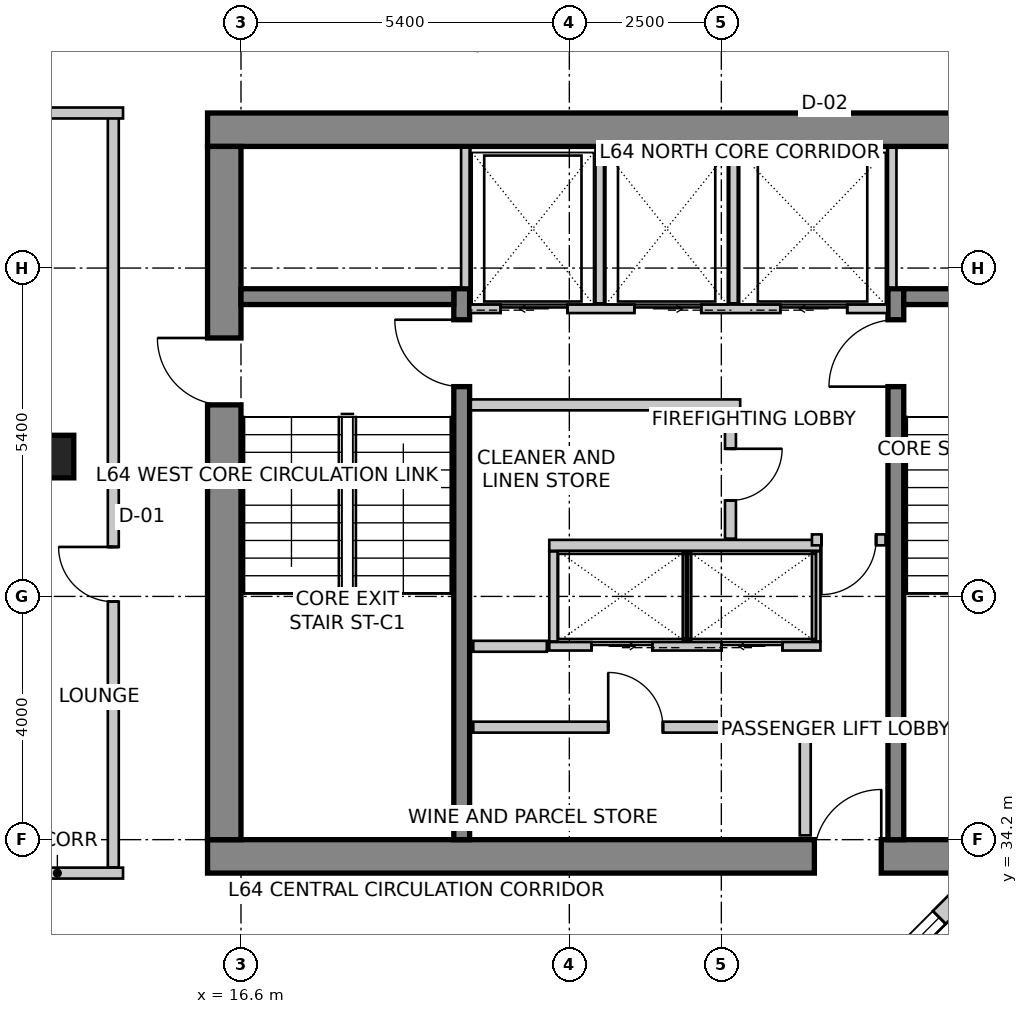
"""IFC4 building model, lengths in metres.
Left out: names, types, materials, properties, quantities, classifications, styles, units other than length and angle.
Written with IfcOpenShell. Run it as: python <this file> out.ifc"""

import sys

from ifc_helpers import new_model, si_unit, direction, frame, frame_2d, origin, origin_2d, place, context, subcontext, project, spatial, rectangle, extrude, source, transform, mapped, element, fill, save


model = new_model("IFC4")
c1 = context("Model", 3, precision=1e-05, world=origin(), true_north=direction((0.0, 1.0)))
c2 = subcontext(c1, "Body", "Model", "MODEL_VIEW")
j1 = project(units=[si_unit("LENGTHUNIT", "METRE"), si_unit("PLANEANGLEUNIT", "RADIAN")], contexts=[c1])
p1 = place(None, origin())
s1 = spatial("IfcSite", under=j1, at=p1, CompositionType="ELEMENT")
p2 = place(p1, origin())
s2 = spatial("IfcBuilding", under=s1, at=p2, CompositionType="ELEMENT")
p3 = place(p2, frame((0.0, 0.0, 252.9)))
s3 = spatial("IfcBuildingStorey", under=s2, at=p3, CompositionType="ELEMENT", Elevation=252.9)
p4 = place(p3, frame((16.05, 45.875, 0.0), z_axis=(0.0, 0.0, 1.0), x_axis=(1.0, 0.0, 0.0)))
e1 = element("IfcWall", 1, at=p4, inside=s3, PredefinedType="SHEAR", context=c2, shape_type="SweptSolid", body=[
    extrude(rectangle(XDim=15.5, YDim=0.55, at=frame_2d((7.75, 0.0))), origin(), (0.0, 0.0, 1.0), 3.6),
])
p5 = place(p3, frame((16.05, 33.925, 0.0), z_axis=(0.0, 0.0, 1.0), x_axis=(1.0, 0.0, 0.0)))
e2 = element("IfcWall", 2, at=p5, inside=s3, PredefinedType="SHEAR", context=c2, shape_type="SweptSolid", body=[
    extrude(rectangle(XDim=15.5, YDim=0.55, at=frame_2d((7.75, 0.0))), origin(), (0.0, 0.0, 1.0), 3.6),
])
m1 = source(origin(), c2, "Body", "SweptSolid", [
    extrude(rectangle(XDim=1.1, YDim=2.15, at=frame_2d((0.55, 1.075))), frame((0.0, 0.285, 0.0), z_axis=(0.0, -1.0, 0.0), x_axis=(1.0, 0.0, 0.0)), (0.0, 0.0, 1.0), 0.57),
])
p6 = place(p5, frame((9.98, 0.0, 0.0)))
e3 = element("IfcOpeningElement", 3, at=p6, cuts=e2, PredefinedType="OPENING", context=c2, shape_type="MappedRepresentation", body=[
    mapped(m1, transform((0.0, 0.0, 0.0), scale=1.0)),
])
p7 = place(p3, frame((16.325, 34.2, 0.0), z_axis=(0.0, 0.0, 1.0), x_axis=(0.0, 1.0, 0.0)))
e4 = element("IfcWall", 4, at=p7, inside=s3, PredefinedType="SHEAR", context=c2, shape_type="SweptSolid", body=[
    extrude(rectangle(XDim=11.4, YDim=0.55, at=frame_2d((5.7, 0.0))), origin(), (0.0, 0.0, 1.0), 3.6),
])
p8 = place(p7, frame((7.15, 0.0, 0.0)))
e5 = element("IfcOpeningElement", 5, at=p8, cuts=e4, PredefinedType="OPENING", context=c2, shape_type="MappedRepresentation", body=[
    mapped(m1, transform((0.0, 0.0, 0.0), scale=1.0)),
])
p9 = place(p3, frame((20.23, 34.2, 0.0), z_axis=(0.0, 0.0, 1.0), x_axis=(0.0, 1.0, 0.0)))
e6 = element("IfcWall", 6, at=p9, inside=s3, PredefinedType="SHEAR", context=c2, shape_type="SweptSolid", body=[
    extrude(rectangle(XDim=9.06, YDim=0.26, at=frame_2d((4.53, 0.0))), origin(), (0.0, 0.0, 1.0), 3.6),
])
m2 = source(origin(), c2, "Body", "SweptSolid", [
    extrude(rectangle(XDim=1.1, YDim=2.15, at=frame_2d((0.55, 1.075))), frame((0.0, 0.14, 0.0), z_axis=(0.0, -1.0, 0.0), x_axis=(1.0, 0.0, 0.0)), (0.0, 0.0, 1.0), 0.28),
])
p10 = place(p9, frame((7.45, 0.0, 0.0)))
e7 = element("IfcOpeningElement", 7, at=p10, cuts=e6, PredefinedType="OPENING", context=c2, shape_type="MappedRepresentation", body=[
    mapped(m2, transform((0.0, 0.0, 0.0), scale=1.0)),
])
p11 = place(p3, frame((27.37, 34.2, 0.0), z_axis=(0.0, 0.0, 1.0), x_axis=(0.0, 1.0, 0.0)))
e8 = element("IfcWall", 8, at=p11, inside=s3, PredefinedType="SHEAR", context=c2, shape_type="SweptSolid", body=[
    extrude(rectangle(XDim=9.06, YDim=0.26, at=frame_2d((4.53, 0.0))), origin(), (0.0, 0.0, 1.0), 3.6),
])
p12 = place(p11, frame((7.45, 0.0, 0.0)))
e9 = element("IfcOpeningElement", 9, at=p12, cuts=e8, PredefinedType="OPENING", context=c2, shape_type="MappedRepresentation", body=[
    mapped(m2, transform((0.0, 0.0, 0.0), scale=1.0)),
])
for number, where, z_axis, x_axis in (
    (10, (16.6, 43.13, 0.0), (0.0, 0.0, 1.0), (1.0, 0.0, 0.0)),
    (11, (27.5, 43.13, 0.0), (0.0, 0.0, 1.0), (1.0, 0.0, 0.0)),
):
    element("IfcWall", number, at=place(p3, frame(where, z_axis=z_axis, x_axis=x_axis)), inside=s3, PredefinedType="SHEAR", context=c2, shape_type="SweptSolid", body=[
        extrude(rectangle(XDim=3.5, YDim=0.26, at=frame_2d((1.75, 0.0))), origin(), (0.0, 0.0, 1.0), 3.6),
    ])
m3 = source(origin(), c2, "Body", "SweptSolid", [
    extrude(rectangle(XDim=0.7, YDim=0.7, at=origin_2d()), origin(), (0.0, 0.0, 1.0), 3.6),
])
p13 = place(p3, frame((13.5, 40.5, 0.0), z_axis=(0.0, 0.0, 1.0), x_axis=(1.0, 0.0, 0.0)))
e12 = element("IfcColumn", 12, at=p13, inside=s3, PredefinedType="COLUMN", context=c2, shape_type="MappedRepresentation", body=[
    mapped(m3, transform((0.0, 0.0, 0.0), scale=1.0)),
])
p14 = place(p3, frame((26.42, 31.256, 0.0), z_axis=(0.0, 0.0, 1.0), x_axis=(0.707106781187, 0.707106781187, 0.0)))
e13 = element("IfcWall", 13, at=p14, inside=s3, PredefinedType="SOLIDWALL", context=c2, shape_type="SweptSolid", body=[
    extrude(rectangle(XDim=2.907, YDim=0.3, at=frame_2d((1.454, 0.0))), origin(), (0.0, 0.0, 1.0), 3.35),
])
m4 = source(origin(), c2, "Body", "SweptSolid", [
    extrude(rectangle(XDim=1.8, YDim=2.1, at=frame_2d((0.9, 1.05))), frame((0.0, 0.16, 0.0), z_axis=(0.0, -1.0, 0.0), x_axis=(1.0, 0.0, 0.0)), (0.0, 0.0, 1.0), 0.32),
])
p15 = place(p14, frame((0.554, 0.0, 0.85)))
e14 = element("IfcOpeningElement", 14, at=p15, cuts=e13, PredefinedType="OPENING", context=c2, shape_type="MappedRepresentation", body=[
    mapped(m4, transform((0.0, 0.0, 0.0), scale=1.0)),
])
p16 = place(p3, frame((21.874, 52.742, 0.0), z_axis=(0.0, 0.0, 1.0), x_axis=(-0.84365659959, -0.536883173482, 0.0)))
e15 = element("IfcWall", 15, at=p16, inside=s3, PredefinedType="SOLIDWALL", context=c2, shape_type="SweptSolid", body=[
    extrude(rectangle(XDim=10.283, YDim=0.3, at=frame_2d((5.142, 0.0))), origin(), (0.0, 0.0, 1.0), 3.35),
])
m5 = source(origin(), c2, "Body", "SweptSolid", [
    extrude(rectangle(XDim=2.1, YDim=2.0, at=frame_2d((1.05, 1.0))), frame((0.0, 0.16, 0.0), z_axis=(0.0, -1.0, 0.0), x_axis=(1.0, 0.0, 0.0)), (0.0, 0.0, 1.0), 0.32),
])
p17 = place(p16, frame((1.41, 0.0, 0.85)))
e16 = element("IfcOpeningElement", 16, at=p17, cuts=e15, PredefinedType="OPENING", context=c2, shape_type="MappedRepresentation", body=[
    mapped(m5, transform((0.0, 0.0, 0.0), scale=1.0)),
])
m6 = source(origin(), c2, "Body", "SweptSolid", [
    extrude(rectangle(XDim=2.4, YDim=2.2, at=frame_2d((1.2, 1.1))), frame((0.0, 0.16, 0.0), z_axis=(0.0, -1.0, 0.0), x_axis=(1.0, 0.0, 0.0)), (0.0, 0.0, 1.0), 0.32),
])
p18 = place(p16, frame((5.54, 0.0, 0.85)))
e17 = element("IfcOpeningElement", 17, at=p18, cuts=e15, PredefinedType="OPENING", context=c2, shape_type="MappedRepresentation", body=[
    mapped(m6, transform((0.0, 0.0, 0.0), scale=1.0)),
])
p19 = place(p3, frame((20.37, 42.93, 0.0), z_axis=(0.0, 0.0, 1.0), x_axis=(1.0, 0.0, 0.0)))
e18 = element("IfcWall", 18, at=p19, inside=s3, PredefinedType="SOLIDWALL", context=c2, shape_type="SweptSolid", body=[
    extrude(rectangle(XDim=6.86, YDim=0.14, at=frame_2d((3.43, 0.0))), origin(), (0.0, 0.0, 1.0), 3.35),
])
m7 = source(origin(), c2, "Body", "SweptSolid", [
    extrude(rectangle(XDim=1.1, YDim=2.15, at=frame_2d((0.55, 1.075))), frame((0.0, 0.08, 0.0), z_axis=(0.0, -1.0, 0.0), x_axis=(1.0, 0.0, 0.0)), (0.0, 0.0, 1.0), 0.16),
])
p20 = place(p19, frame((0.5, 0.0, 0.0)))
e19 = element("IfcOpeningElement", 19, at=p20, cuts=e18, PredefinedType="OPENING", context=c2, shape_type="MappedRepresentation", body=[
    mapped(m7, transform((0.0, 0.0, 0.0), scale=1.0)),
])
p21 = place(p19, frame((2.7, 0.0, 0.0)))
e20 = element("IfcOpeningElement", 20, at=p21, cuts=e18, PredefinedType="OPENING", context=c2, shape_type="MappedRepresentation", body=[
    mapped(m7, transform((0.0, 0.0, 0.0), scale=1.0)),
])
p22 = place(p19, frame((5.1, 0.0, 0.0)))
e21 = element("IfcOpeningElement", 21, at=p22, cuts=e18, PredefinedType="OPENING", context=c2, shape_type="MappedRepresentation", body=[
    mapped(m7, transform((0.0, 0.0, 0.0), scale=1.0)),
])
for number, where, z_axis, x_axis in (
    (22, (20.29, 43.28, 0.0), (0.0, 0.0, 1.0), (0.0, 1.0, 0.0)),
    (23, (27.31, 43.28, 0.0), (0.0, 0.0, 1.0), (0.0, 1.0, 0.0)),
):
    element("IfcWall", number, at=place(p3, frame(where, z_axis=z_axis, x_axis=x_axis)), inside=s3, PredefinedType="SOLIDWALL", context=c2, shape_type="SweptSolid", body=[
        extrude(rectangle(XDim=2.3, YDim=0.14, at=frame_2d((1.15, 0.0))), origin(), (0.0, 0.0, 1.0), 3.35),
    ])
for number, where, z_axis, x_axis in (
    (24, (22.5, 43.02, 0.0), (0.0, 0.0, 1.0), (0.0, 1.0, 0.0)),
    (25, (24.7, 43.02, 0.0), (0.0, 0.0, 1.0), (0.0, 1.0, 0.0)),
):
    element("IfcWall", number, at=place(p3, frame(where, z_axis=z_axis, x_axis=x_axis)), inside=s3, PredefinedType="SOLIDWALL", context=c2, shape_type="SweptSolid", body=[
        extrude(rectangle(XDim=2.56, YDim=0.14, at=frame_2d((1.28, 0.0))), origin(), (0.0, 0.0, 1.0), 3.35),
    ])
p23 = place(p3, frame((21.67, 37.38, 0.0), z_axis=(0.0, 0.0, 1.0), x_axis=(1.0, 0.0, 0.0)))
e26 = element("IfcWall", 26, at=p23, inside=s3, PredefinedType="SOLIDWALL", context=c2, shape_type="SweptSolid", body=[
    extrude(rectangle(XDim=4.46, YDim=0.14, at=frame_2d((2.23, 0.0))), origin(), (0.0, 0.0, 1.0), 3.35),
])
m8 = source(origin(), c2, "Body", "SweptSolid", [
    extrude(rectangle(XDim=1.0, YDim=2.15, at=frame_2d((0.5, 1.075))), frame((0.0, 0.08, 0.0), z_axis=(0.0, -1.0, 0.0), x_axis=(1.0, 0.0, 0.0)), (0.0, 0.0, 1.0), 0.16),
])
p24 = place(p23, frame((0.695, 0.0, 0.0)))
e27 = element("IfcOpeningElement", 27, at=p24, cuts=e26, PredefinedType="OPENING", context=c2, shape_type="MappedRepresentation", body=[
    mapped(m8, transform((0.0, 0.0, 0.0), scale=1.0)),
])
p25 = place(p23, frame((2.835, 0.0, 0.0)))
e28 = element("IfcOpeningElement", 28, at=p25, cuts=e26, PredefinedType="OPENING", context=c2, shape_type="MappedRepresentation", body=[
    mapped(m8, transform((0.0, 0.0, 0.0), scale=1.0)),
])
p26 = place(p3, frame((21.67, 39.04, 0.0), z_axis=(0.0, 0.0, 1.0), x_axis=(1.0, 0.0, 0.0)))
e29 = element("IfcWall", 29, at=p26, inside=s3, PredefinedType="SOLIDWALL", context=c2, shape_type="SweptSolid", body=[
    extrude(rectangle(XDim=4.46, YDim=0.18, at=frame_2d((2.23, 0.0))), origin(), (0.0, 0.0, 1.0), 3.35),
])
for number, where, z_axis, x_axis in (
    (30, (26.06, 37.46, 0.0), (0.0, 0.0, 1.0), (0.0, 1.0, 0.0)),
    (31, (21.74, 37.46, 0.0), (0.0, 0.0, 1.0), (0.0, 1.0, 0.0)),
    (32, (23.935, 37.46, 0.0), (0.0, 0.0, 1.0), (0.0, 1.0, 0.0)),
):
    element("IfcWall", number, at=place(p3, frame(where, z_axis=z_axis, x_axis=x_axis)), inside=s3, PredefinedType="SOLIDWALL", context=c2, shape_type="SweptSolid", body=[
        extrude(rectangle(XDim=1.48, YDim=0.14, at=frame_2d((0.74, 0.0))), origin(), (0.0, 0.0, 1.0), 3.35),
    ])
p27 = place(p3, frame((24.81, 41.35, 0.0), z_axis=(0.0, 0.0, 1.0), x_axis=(-1.0, 0.0, 0.0)))
e33 = element("IfcWall", 33, at=p27, inside=s3, PredefinedType="PARTITIONING", context=c2, shape_type="SweptSolid", body=[
    extrude(rectangle(XDim=4.43, YDim=0.18, at=frame_2d((2.215, 0.0))), origin(), (0.0, 0.0, 1.0), 3.35),
])
p28 = place(p3, frame((24.65, 41.256, 0.0), z_axis=(0.0, 0.0, 1.0), x_axis=(0.0, -1.0, 0.0)))
e34 = element("IfcWall", 34, at=p28, inside=s3, PredefinedType="PARTITIONING", context=c2, shape_type="SweptSolid", body=[
    extrude(rectangle(XDim=2.106, YDim=0.18, at=frame_2d((1.053, 0.0))), origin(), (0.0, 0.0, 1.0), 3.35),
])
m9 = source(origin(), c2, "Body", "SweptSolid", [
    extrude(rectangle(XDim=0.85, YDim=2.15, at=frame_2d((0.425, 1.075))), frame((0.0, 0.1, 0.0), z_axis=(0.0, -1.0, 0.0), x_axis=(1.0, 0.0, 0.0)), (0.0, 0.0, 1.0), 0.2),
])
p29 = place(p28, frame((0.628, 0.0, 0.0)))
e35 = element("IfcOpeningElement", 35, at=p29, cuts=e34, PredefinedType="OPENING", context=c2, shape_type="MappedRepresentation", body=[
    mapped(m9, transform((0.0, 0.0, 0.0), scale=1.0)),
])
p30 = place(p3, frame((21.63, 37.38, 0.0), z_axis=(0.0, 0.0, 1.0), x_axis=(-1.0, 0.0, 0.0)))
e36 = element("IfcWall", 36, at=p30, inside=s3, PredefinedType="PARTITIONING", context=c2, shape_type="SweptSolid", body=[
    extrude(rectangle(XDim=1.21, YDim=0.18, at=frame_2d((0.605, 0.0))), origin(), (0.0, 0.0, 1.0), 3.35),
])
p31 = place(p3, frame((27.2, 39.13, 0.0), z_axis=(0.0, 0.0, 1.0), x_axis=(-1.0, 0.0, 0.0)))
e37 = element("IfcWall", 37, at=p31, inside=s3, PredefinedType="PARTITIONING", context=c2, shape_type="SweptSolid", body=[
    extrude(rectangle(XDim=1.21, YDim=0.18, at=frame_2d((0.605, 0.0))), origin(), (0.0, 0.0, 1.0), 3.35),
])
m10 = source(origin(), c2, "Body", "SweptSolid", [
    extrude(rectangle(XDim=0.9, YDim=2.15, at=frame_2d((0.45, 1.075))), frame((0.0, 0.1, 0.0), z_axis=(0.0, -1.0, 0.0), x_axis=(1.0, 0.0, 0.0)), (0.0, 0.0, 1.0), 0.2),
])
p32 = place(p31, frame((0.155, 0.0, 0.0)))
e38 = element("IfcOpeningElement", 38, at=p32, cuts=e37, PredefinedType="OPENING", context=c2, shape_type="MappedRepresentation", body=[
    mapped(m10, transform((0.0, 0.0, 0.0), scale=1.0)),
])
p33 = place(p3, frame((20.42, 36.05, 0.0), z_axis=(0.0, 0.0, 1.0), x_axis=(1.0, 0.0, 0.0)))
e39 = element("IfcWall", 39, at=p33, inside=s3, PredefinedType="PARTITIONING", context=c2, shape_type="SweptSolid", body=[
    extrude(rectangle(XDim=5.46, YDim=0.18, at=frame_2d((2.73, 0.0))), origin(), (0.0, 0.0, 1.0), 3.35),
])
p34 = place(p33, frame((2.219, 0.0, 0.0)))
e40 = element("IfcOpeningElement", 40, at=p34, cuts=e39, PredefinedType="OPENING", context=c2, shape_type="MappedRepresentation", body=[
    mapped(m10, transform((0.0, 0.0, 0.0), scale=1.0)),
])
p35 = place(p3, frame((25.88, 35.956, 0.0), z_axis=(0.0, 0.0, 1.0), x_axis=(0.0, -1.0, 0.0)))
e41 = element("IfcWall", 41, at=p35, inside=s3, PredefinedType="PARTITIONING", context=c2, shape_type="SweptSolid", body=[
    extrude(rectangle(XDim=1.686, YDim=0.18, at=frame_2d((0.843, 0.0))), origin(), (0.0, 0.0, 1.0), 2.642),
])
p36 = place(p3, frame((12.5, 33.65, 0.0), z_axis=(0.0, 0.0, 1.0), x_axis=(1.0, 0.0, 0.0)))
e42 = element("IfcWall", 42, at=p36, inside=s3, PredefinedType="PARTITIONING", context=c2, shape_type="SweptSolid", body=[
    extrude(rectangle(XDim=2.16, YDim=0.18, at=frame_2d((1.08, 0.0))), origin(), (0.0, 0.0, 1.0), 3.35),
])
p37 = place(p3, frame((14.5, 33.744, 0.0), z_axis=(0.0, 0.0, 1.0), x_axis=(0.0, 1.0, 0.0)))
e43 = element("IfcWall", 43, at=p37, inside=s3, PredefinedType="PARTITIONING", context=c2, shape_type="SweptSolid", body=[
    extrude(rectangle(XDim=12.406, YDim=0.18, at=frame_2d((6.203, 0.0))), origin(), (0.0, 0.0, 1.0), 3.35),
])
p38 = place(p37, frame((4.37, 0.0, 0.0)))
e44 = element("IfcOpeningElement", 44, at=p38, cuts=e43, PredefinedType="OPENING", context=c2, shape_type="MappedRepresentation", body=[
    mapped(m10, transform((0.0, 0.0, 0.0), scale=1.0)),
])
p39 = place(p3, frame((14.66, 46.15, 0.0), z_axis=(0.0, 0.0, 1.0), x_axis=(-1.0, 0.0, 0.0)))
e45 = element("IfcWall", 45, at=p39, inside=s3, PredefinedType="PARTITIONING", context=c2, shape_type="SweptSolid", body=[
    extrude(rectangle(XDim=1.602, YDim=0.18, at=frame_2d((0.801, 0.0))), origin(), (0.0, 0.0, 1.0), 3.35),
])
m11 = source(origin(), c2, "Body", "SweptSolid", [
    extrude(rectangle(XDim=1.8, YDim=2.1, at=frame_2d((0.9, 1.05))), frame((0.0, -0.015, 0.0), z_axis=(0.0, -1.0, 0.0), x_axis=(1.0, 0.0, 0.0)), (0.0, 0.0, 1.0), 0.06),
])
p40 = place(p15, origin())
e46 = element("IfcWindow", 46, at=p40, inside=s3, PartitioningType="SINGLE_PANEL", PredefinedType="WINDOW", context=c2, shape_type="MappedRepresentation", body=[
    mapped(m11, transform((0.0, 0.0, 0.0), scale=1.0)),
])
fill(e14, e46)
m12 = source(origin(), c2, "Body", "SweptSolid", [
    extrude(rectangle(XDim=1.1, YDim=2.15, at=frame_2d((0.55, 1.075))), frame((0.0, 0.025, 0.0), z_axis=(0.0, -1.0, 0.0), x_axis=(1.0, 0.0, 0.0)), (0.0, 0.0, 1.0), 0.05),
])
p41 = place(p20, origin())
e47 = element("IfcDoor", 47, at=p41, inside=s3, OperationType="SLIDING_TO_LEFT", PredefinedType="DOOR", context=c2, shape_type="MappedRepresentation", body=[
    mapped(m12, transform((0.0, 0.0, 0.0), scale=1.0)),
])
fill(e19, e47)
p42 = place(p21, origin())
e48 = element("IfcDoor", 48, at=p42, inside=s3, OperationType="SLIDING_TO_RIGHT", PredefinedType="DOOR", context=c2, shape_type="MappedRepresentation", body=[
    mapped(m12, transform((0.0, 0.0, 0.0), scale=1.0)),
])
fill(e20, e48)
m13 = source(origin(), c2, "Body", "SweptSolid", [
    extrude(rectangle(XDim=1.1, YDim=2.15, at=frame_2d((0.55, 1.075))), frame((0.0, 0.025, 0.0), z_axis=(0.0, -1.0, 0.0), x_axis=(1.0, 0.0, 0.0)), (0.0, 0.0, 1.0), 0.05),
])
p43 = place(p22, origin())
e49 = element("IfcDoor", 49, at=p43, inside=s3, OperationType="SLIDING_TO_LEFT", PredefinedType="DOOR", context=c2, shape_type="MappedRepresentation", body=[
    mapped(m13, transform((0.0, 0.0, 0.0), scale=1.0)),
])
fill(e21, e49)
m14 = source(origin(), c2, "Body", "SweptSolid", [
    extrude(rectangle(XDim=1.0, YDim=2.15, at=frame_2d((0.5, 1.075))), frame((0.0, 0.025, 0.0), z_axis=(0.0, -1.0, 0.0), x_axis=(1.0, 0.0, 0.0)), (0.0, 0.0, 1.0), 0.05),
])
p44 = place(p24, origin())
e50 = element("IfcDoor", 50, at=p44, inside=s3, OperationType="SLIDING_TO_RIGHT", PredefinedType="DOOR", context=c2, shape_type="MappedRepresentation", body=[
    mapped(m14, transform((0.0, 0.0, 0.0), scale=1.0)),
])
fill(e27, e50)
p45 = place(p25, origin())
e51 = element("IfcDoor", 51, at=p45, inside=s3, OperationType="SLIDING_TO_LEFT", PredefinedType="DOOR", context=c2, shape_type="MappedRepresentation", body=[
    mapped(m14, transform((0.0, 0.0, 0.0), scale=1.0)),
])
fill(e28, e51)
m15 = source(origin(), c2, "Body", "SweptSolid", [
    extrude(rectangle(XDim=1.1, YDim=2.15, at=frame_2d((0.55, 1.075))), frame((0.0, 0.025, 0.0), z_axis=(0.0, -1.0, 0.0), x_axis=(1.0, 0.0, 0.0)), (0.0, 0.0, 1.0), 0.05),
])
p46 = place(p10, origin())
e52 = element("IfcDoor", 52, at=p46, inside=s3, OperationType="SINGLE_SWING_RIGHT", PredefinedType="DOOR", context=c2, shape_type="MappedRepresentation", body=[
    mapped(m15, transform((0.0, 0.0, 0.0), scale=1.0)),
])
fill(e7, e52)
p47 = place(p12, origin())
e53 = element("IfcDoor", 53, at=p47, inside=s3, OperationType="SINGLE_SWING_LEFT", PredefinedType="DOOR", context=c2, shape_type="MappedRepresentation", body=[
    mapped(m15, transform((0.0, 0.0, 0.0), scale=1.0)),
])
fill(e9, e53)
p48 = place(p8, origin())
e54 = element("IfcDoor", 54, at=p48, inside=s3, OperationType="SINGLE_SWING_RIGHT", PredefinedType="DOOR", context=c2, shape_type="MappedRepresentation", body=[
    mapped(m15, transform((0.0, 0.0, 0.0), scale=1.0)),
])
fill(e5, e54)
p49 = place(p6, origin())
e55 = element("IfcDoor", 55, at=p49, inside=s3, OperationType="SINGLE_SWING_RIGHT", PredefinedType="DOOR", context=c2, shape_type="MappedRepresentation", body=[
    mapped(m15, transform((0.0, 0.0, 0.0), scale=1.0)),
])
fill(e3, e55)
m16 = source(origin(), c2, "Body", "SweptSolid", [
    extrude(rectangle(XDim=0.85, YDim=2.15, at=frame_2d((0.425, 1.075))), frame((0.0, 0.025, 0.0), z_axis=(0.0, -1.0, 0.0), x_axis=(1.0, 0.0, 0.0)), (0.0, 0.0, 1.0), 0.05),
])
p50 = place(p29, origin())
e56 = element("IfcDoor", 56, at=p50, inside=s3, OperationType="SINGLE_SWING_LEFT", PredefinedType="DOOR", context=c2, shape_type="MappedRepresentation", body=[
    mapped(m16, transform((0.0, 0.0, 0.0), scale=1.0)),
])
fill(e35, e56)
m17 = source(origin(), c2, "Body", "SweptSolid", [
    extrude(rectangle(XDim=0.9, YDim=2.15, at=frame_2d((0.45, 1.075))), frame((0.0, 0.025, 0.0), z_axis=(0.0, -1.0, 0.0), x_axis=(1.0, 0.0, 0.0)), (0.0, 0.0, 1.0), 0.05),
])
p51 = place(p32, origin())
e57 = element("IfcDoor", 57, at=p51, inside=s3, OperationType="SINGLE_SWING_RIGHT", PredefinedType="DOOR", context=c2, shape_type="MappedRepresentation", body=[
    mapped(m17, transform((0.0, 0.0, 0.0), scale=1.0)),
])
fill(e38, e57)
p52 = place(p34, origin())
e58 = element("IfcDoor", 58, at=p52, inside=s3, OperationType="SINGLE_SWING_LEFT", PredefinedType="DOOR", context=c2, shape_type="MappedRepresentation", body=[
    mapped(m17, transform((0.0, 0.0, 0.0), scale=1.0)),
])
fill(e40, e58)
m18 = source(origin(), c2, "Body", "SweptSolid", [
    extrude(rectangle(XDim=0.9, YDim=2.15, at=frame_2d((0.45, 1.075))), frame((0.0, 0.025, 0.0), z_axis=(0.0, -1.0, 0.0), x_axis=(1.0, 0.0, 0.0)), (0.0, 0.0, 1.0), 0.05),
])
p53 = place(p38, origin())
e59 = element("IfcDoor", 59, at=p53, inside=s3, OperationType="SINGLE_SWING_RIGHT", PredefinedType="DOOR", context=c2, shape_type="MappedRepresentation", body=[
    mapped(m18, transform((0.0, 0.0, 0.0), scale=1.0)),
])
fill(e44, e59)
save(model, sys.argv[1])
